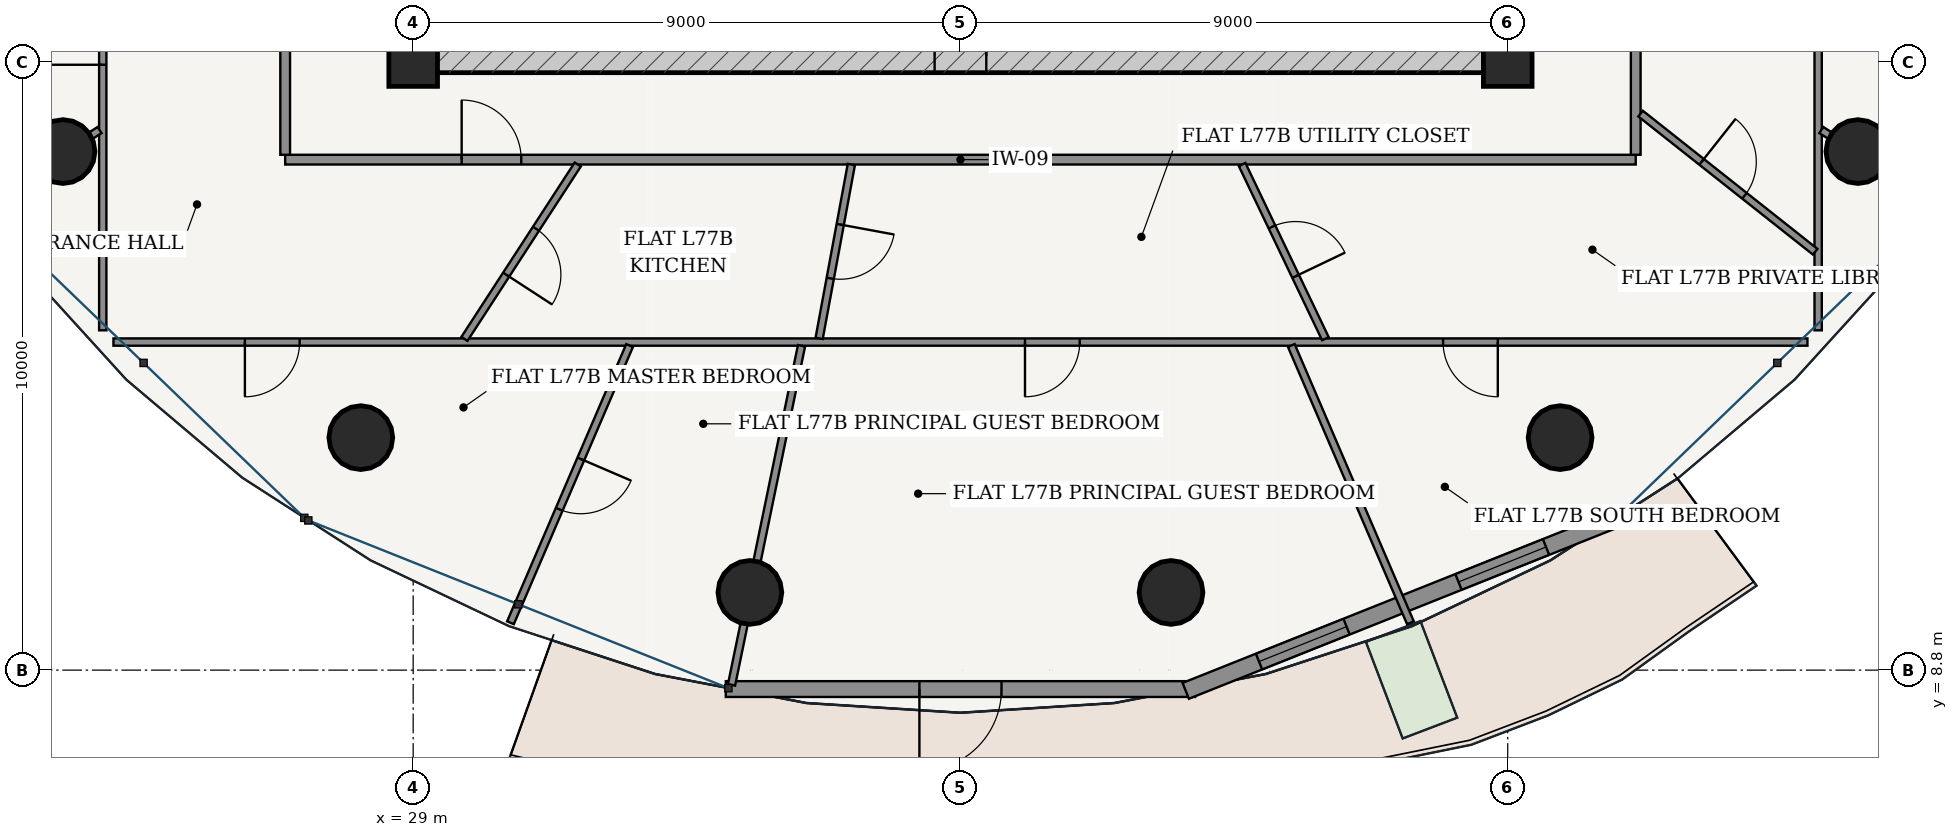
"""IFC4 building model, lengths in metres.
Left out: names, types, materials, properties, quantities, classifications, styles, units other than length and angle.
Written with IfcOpenShell. Run it as: python <this file> out.ifc"""

import sys

from ifc_helpers import new_model, si_unit, direction, frame, frame_2d, origin, origin_2d, place, context, subcontext, project, spatial, rectangle, hollow_circle, extrude, source, transform, mapped, element, fill, save


model = new_model("IFC4")
c1 = context("Model", 3, precision=1e-05, world=origin(), true_north=direction((-0.2419218956, 0.970295726276)))
c2 = subcontext(c1, "Body", "Model", "MODEL_VIEW")
j1 = project(units=[si_unit("LENGTHUNIT", "METRE"), si_unit("PLANEANGLEUNIT", "RADIAN")], contexts=[c1])
p1 = place(None, origin())
s1 = spatial("IfcSite", under=j1, at=p1, CompositionType="ELEMENT")
p2 = place(p1, origin())
s2 = spatial("IfcBuilding", under=s1, at=p2, CompositionType="ELEMENT")
p3 = place(p2, frame((0.0, 0.0, 293.2)))
s3 = spatial("IfcBuildingStorey", under=s2, at=p3, CompositionType="ELEMENT", Elevation=293.2)
for number, where, z_axis, x_axis in (
    (1, (29.0, 18.8, 0.0), (0.0, 0.0, 1.0), (1.0, 0.0, 0.0)),
    (2, (47.0, 18.8, 0.0), (0.0, 0.0, 1.0), (1.0, 0.0, 0.0)),
):
    element("IfcColumn", number, at=place(p3, frame(where, z_axis=z_axis, x_axis=x_axis)), inside=s3, PredefinedType="COLUMN", context=c2, shape_type="SweptSolid", body=[
        extrude(rectangle(XDim=0.8, YDim=0.8, at=origin_2d()), origin(), (0.0, 0.0, 1.0), 3.75),
    ])
p4 = place(p3, frame((28.825, 18.9, 0.0), z_axis=(0.0, 0.0, 1.0), x_axis=(1.0, 0.0, 0.0)))
e3 = element("IfcWall", 3, at=p4, inside=s3, PredefinedType="SHEAR", context=c2, shape_type="SweptSolid", body=[
    extrude(rectangle(XDim=18.35, YDim=0.55, at=frame_2d((9.175, 0.0))), origin(), (0.0, 0.0, 1.0), 3.49),
])
p5 = place(p4, frame((8.75, 0.0, 0.0)))
e4 = element("IfcOpeningElement", 4, at=p5, cuts=e3, PredefinedType="OPENING", context=c2, shape_type="SweptSolid", body=[
    extrude(rectangle(XDim=0.85, YDim=2.1, at=frame_2d((0.425, 1.05))), frame((0.0, 0.285, 0.0), z_axis=(0.0, -1.0, 0.0), x_axis=(1.0, 0.0, 0.0)), (0.0, 0.0, 1.0), 0.57),
])
for number, where, z_axis, x_axis in (
    (5, (23.241, 17.328, 0.0), (0.0, 0.0, 1.0), (1.0, 0.0, 0.0)),
    (6, (28.139, 12.624, 0.0), (0.0, 0.0, 1.0), (1.0, 0.0, 0.0)),
    (7, (34.537, 10.078, 0.0), (0.0, 0.0, 1.0), (1.0, 0.0, 0.0)),
    (8, (41.463, 10.078, 0.0), (0.0, 0.0, 1.0), (1.0, 0.0, 0.0)),
    (9, (47.861, 12.624, 0.0), (0.0, 0.0, 1.0), (1.0, 0.0, 0.0)),
    (10, (52.759, 17.328, 0.0), (0.0, 0.0, 1.0), (1.0, 0.0, 0.0)),
):
    element("IfcColumn", number, at=place(p3, frame(where, z_axis=z_axis, x_axis=x_axis)), inside=s3, PredefinedType="COLUMN", context=c2, shape_type="SweptSolid", body=[
        extrude(hollow_circle(Radius=0.525, WallThickness=0.035, at=origin_2d()), origin(), (0.0, 0.0, 1.0), 3.75),
    ])
p6 = place(p3, frame((34.141, 8.489, 0.0), z_axis=(0.0, 0.0, 1.0), x_axis=(1.0, 0.0, 0.0)))
e11 = element("IfcWall", 11, at=p6, inside=s3, PredefinedType="SOLIDWALL", context=c2, shape_type="SweptSolid", body=[
    extrude(rectangle(XDim=7.718, YDim=0.26, at=frame_2d((3.859, 0.0))), origin(), (0.0, 0.0, 1.0), 3.49),
])
p7 = place(p6, frame((3.184, 0.0, 0.0)))
e12 = element("IfcOpeningElement", 12, at=p7, cuts=e11, PredefinedType="OPENING", context=c2, shape_type="SweptSolid", body=[
    extrude(rectangle(XDim=1.35, YDim=2.2, at=frame_2d((0.675, 1.1))), frame((0.0, 0.14, 0.0), z_axis=(0.0, -1.0, 0.0), x_axis=(1.0, 0.0, 0.0)), (0.0, 0.0, 1.0), 0.28),
])
p8 = place(p3, frame((41.705, 8.459, 0.0), z_axis=(0.0, 0.0, 1.0), x_axis=(0.92871332341, 0.370798547626, 0.0)))
e13 = element("IfcWall", 13, at=p8, inside=s3, PredefinedType="SOLIDWALL", context=c2, shape_type="SweptSolid", body=[
    extrude(rectangle(XDim=7.678, YDim=0.28, at=frame_2d((3.839, 0.0))), origin(), (0.0, 0.0, 1.0), 3.49),
])
p9 = place(p8, frame((1.298, 0.0, 0.85)))
e14 = element("IfcOpeningElement", 14, at=p9, cuts=e13, PredefinedType="OPENING", context=c2, shape_type="SweptSolid", body=[
    extrude(rectangle(XDim=1.55, YDim=1.95, at=frame_2d((0.775, 0.975))), frame((0.0, 0.15, 0.0), z_axis=(0.0, -1.0, 0.0), x_axis=(1.0, 0.0, 0.0)), (0.0, 0.0, 1.0), 0.3),
])
p10 = place(p8, frame((4.83, 0.0, 0.85)))
e15 = element("IfcOpeningElement", 15, at=p10, cuts=e13, PredefinedType="OPENING", context=c2, shape_type="SweptSolid", body=[
    extrude(rectangle(XDim=1.55, YDim=1.95, at=frame_2d((0.775, 0.975))), frame((0.0, 0.15, 0.0), z_axis=(0.0, -1.0, 0.0), x_axis=(1.0, 0.0, 0.0)), (0.0, 0.0, 1.0), 0.3),
])
p11 = place(p3, frame((26.895, 17.195, 0.0), z_axis=(0.0, 0.0, 1.0), x_axis=(1.0, 0.0, 0.0)))
e16 = element("IfcWall", 16, at=p11, inside=s3, PredefinedType="PARTITIONING", context=c2, shape_type="SweptSolid", body=[
    extrude(rectangle(XDim=22.21, YDim=0.16, at=frame_2d((11.105, 0.0))), origin(), (0.0, 0.0, 1.0), 3.015),
])
p12 = place(p11, frame((2.902, 0.0, 0.0)))
e17 = element("IfcOpeningElement", 17, at=p12, cuts=e16, PredefinedType="OPENING", context=c2, shape_type="SweptSolid", body=[
    extrude(rectangle(XDim=0.98, YDim=2.2, at=frame_2d((0.49, 1.1))), frame((0.0, 0.09, 0.0), z_axis=(0.0, -1.0, 0.0), x_axis=(1.0, 0.0, 0.0)), (0.0, 0.0, 1.0), 0.18),
])
for number, where, z_axis, x_axis in (
    (18, (26.895, 17.275, 0.0), (0.0, 0.0, 1.0), (0.0, 1.0, 0.0)),
    (19, (49.105, 17.275, 0.0), (0.0, 0.0, 1.0), (0.0, 1.0, 0.0)),
):
    element("IfcWall", number, at=place(p3, frame(where, z_axis=z_axis, x_axis=x_axis)), inside=s3, PredefinedType="PARTITIONING", context=c2, shape_type="SweptSolid", body=[
        extrude(rectangle(XDim=13.925, YDim=0.16, at=frame_2d((6.962, 0.0))), origin(), (0.0, 0.0, 1.0), 3.015),
    ])
p13 = place(p3, frame((51.929, 14.195, 0.0), z_axis=(0.0, 0.0, 1.0), x_axis=(-1.0, 0.0, 0.0)))
e20 = element("IfcWall", 20, at=p13, inside=s3, PredefinedType="PARTITIONING", context=c2, shape_type="SweptSolid", body=[
    extrude(rectangle(XDim=27.858, YDim=0.12, at=frame_2d((13.929, 0.0))), origin(), (0.0, 0.0, 1.0), 3.015),
])
p14 = place(p13, frame((24.797, 0.0, 0.0)))
e21 = element("IfcOpeningElement", 21, at=p14, cuts=e20, PredefinedType="OPENING", context=c2, shape_type="SweptSolid", body=[
    extrude(rectangle(XDim=0.9, YDim=2.15, at=frame_2d((0.45, 1.075))), frame((0.0, 0.07, 0.0), z_axis=(0.0, -1.0, 0.0), x_axis=(1.0, 0.0, 0.0)), (0.0, 0.0, 1.0), 0.14),
])
p15 = place(p13, frame((11.968, 0.0, 0.0)))
e22 = element("IfcOpeningElement", 22, at=p15, cuts=e20, PredefinedType="OPENING", context=c2, shape_type="SweptSolid", body=[
    extrude(rectangle(XDim=0.9, YDim=2.15, at=frame_2d((0.45, 1.075))), frame((0.0, 0.07, 0.0), z_axis=(0.0, -1.0, 0.0), x_axis=(1.0, 0.0, 0.0)), (0.0, 0.0, 1.0), 0.14),
])
p16 = place(p13, frame((5.092, 0.0, 0.0)))
e23 = element("IfcOpeningElement", 23, at=p16, cuts=e20, PredefinedType="OPENING", context=c2, shape_type="SweptSolid", body=[
    extrude(rectangle(XDim=0.9, YDim=2.15, at=frame_2d((0.45, 1.075))), frame((0.0, 0.07, 0.0), z_axis=(0.0, -1.0, 0.0), x_axis=(1.0, 0.0, 0.0)), (0.0, 0.0, 1.0), 0.14),
])
p17 = place(p3, frame((23.895, 14.388, 0.0), z_axis=(0.0, 0.0, 1.0), x_axis=(0.0, 1.0, 0.0)))
e24 = element("IfcWall", 24, at=p17, inside=s3, PredefinedType="PARTITIONING", context=c2, shape_type="SweptSolid", body=[
    extrude(rectangle(XDim=12.31, YDim=0.12, at=frame_2d((6.155, 0.0))), origin(), (0.0, 0.0, 1.0), 3.015),
])
p18 = place(p17, frame((4.367, 0.0, 0.0)))
e25 = element("IfcOpeningElement", 25, at=p18, cuts=e24, PredefinedType="OPENING", context=c2, shape_type="SweptSolid", body=[
    extrude(rectangle(XDim=0.9, YDim=2.15, at=frame_2d((0.45, 1.075))), frame((0.0, 0.07, 0.0), z_axis=(0.0, -1.0, 0.0), x_axis=(1.0, 0.0, 0.0)), (0.0, 0.0, 1.0), 0.14),
])
p19 = place(p3, frame((52.105, 23.994, 0.0), z_axis=(0.0, 0.0, 1.0), x_axis=(0.0, -1.0, 0.0)))
e26 = element("IfcWall", 26, at=p19, inside=s3, PredefinedType="PARTITIONING", context=c2, shape_type="SweptSolid", body=[
    extrude(rectangle(XDim=9.605, YDim=0.12, at=frame_2d((4.803, 0.0))), origin(), (0.0, 0.0, 1.0), 3.015),
])
p20 = place(p19, frame((2.819, 0.0, 0.0)))
e27 = element("IfcOpeningElement", 27, at=p20, cuts=e26, PredefinedType="OPENING", context=c2, shape_type="SweptSolid", body=[
    extrude(rectangle(XDim=0.9, YDim=2.15, at=frame_2d((0.45, 1.075))), frame((0.0, 0.07, 0.0), z_axis=(0.0, -1.0, 0.0), x_axis=(1.0, 0.0, 0.0)), (0.0, 0.0, 1.0), 0.14),
])
p21 = place(p3, frame((23.843, 17.682, 0.0), z_axis=(0.0, 0.0, 1.0), x_axis=(-0.840690872836, -0.541515333421, 0.0)))
e28 = element("IfcWall", 28, at=p21, inside=s3, PredefinedType="PARTITIONING", context=c2, shape_type="SweptSolid", body=[
    extrude(rectangle(XDim=2.247, YDim=0.12, at=frame_2d((1.123, 0.0))), origin(), (0.0, 0.0, 1.0), 3.015),
])
p22 = place(p3, frame((32.559, 14.138, 0.0), z_axis=(0.0, 0.0, 1.0), x_axis=(-0.394786072864, -0.918773071369, 0.0)))
e29 = element("IfcWall", 29, at=p22, inside=s3, PredefinedType="PARTITIONING", context=c2, shape_type="SweptSolid", body=[
    extrude(rectangle(XDim=4.962, YDim=0.12, at=frame_2d((2.481, 0.0))), origin(), (0.0, 0.0, 1.0), 3.121),
])
p23 = place(p22, frame((2.031, 0.0, 0.0)))
e30 = element("IfcOpeningElement", 30, at=p23, cuts=e29, PredefinedType="OPENING", context=c2, shape_type="SweptSolid", body=[
    extrude(rectangle(XDim=0.9, YDim=2.15, at=frame_2d((0.45, 1.075))), frame((0.0, 0.07, 0.0), z_axis=(0.0, -1.0, 0.0), x_axis=(1.0, 0.0, 0.0)), (0.0, 0.0, 1.0), 0.14),
])
p24 = place(p3, frame((35.386, 14.134, 0.0), z_axis=(0.0, 0.0, 1.0), x_axis=(-0.202089570669, -0.979367043262, 0.0)))
e31 = element("IfcWall", 31, at=p24, inside=s3, PredefinedType="PARTITIONING", context=c2, shape_type="SweptSolid", body=[
    extrude(rectangle(XDim=5.695, YDim=0.12, at=frame_2d((2.847, 0.0))), origin(), (0.0, 0.0, 1.0), 3.015),
])
p25 = place(p3, frame((43.441, 14.138, 0.0), z_axis=(0.0, 0.0, 1.0), x_axis=(0.394786072864, -0.918773071369, 0.0)))
e32 = element("IfcWall", 32, at=p25, inside=s3, PredefinedType="PARTITIONING", context=c2, shape_type="SweptSolid", body=[
    extrude(rectangle(XDim=4.962, YDim=0.12, at=frame_2d((2.481, 0.0))), origin(), (0.0, 0.0, 1.0), 3.121),
])
p26 = place(p3, frame((52.157, 17.682, 0.0), z_axis=(0.0, 0.0, 1.0), x_axis=(0.840690872836, -0.541515333421, 0.0)))
e33 = element("IfcWall", 33, at=p26, inside=s3, PredefinedType="PARTITIONING", context=c2, shape_type="SweptSolid", body=[
    extrude(rectangle(XDim=2.247, YDim=0.12, at=frame_2d((1.123, 0.0))), origin(), (0.0, 0.0, 1.0), 3.015),
])
p27 = place(p3, frame((31.706, 17.115, 0.0), z_axis=(0.0, 0.0, 1.0), x_axis=(-0.544910571015, -0.838494167896, 0.0)))
e34 = element("IfcWall", 34, at=p27, inside=s3, PredefinedType="PARTITIONING", context=c2, shape_type="SweptSolid", body=[
    extrude(rectangle(XDim=3.42, YDim=0.12, at=frame_2d((1.71, 0.0))), origin(), (0.0, 0.0, 1.0), 3.209),
])
p28 = place(p27, frame((1.26, 0.0, 0.0)))
e35 = element("IfcOpeningElement", 35, at=p28, cuts=e34, PredefinedType="OPENING", context=c2, shape_type="SweptSolid", body=[
    extrude(rectangle(XDim=0.9, YDim=2.15, at=frame_2d((0.45, 1.075))), frame((0.0, 0.07, 0.0), z_axis=(0.0, -1.0, 0.0), x_axis=(1.0, 0.0, 0.0)), (0.0, 0.0, 1.0), 0.14),
])
p29 = place(p3, frame((36.206, 17.115, 0.0), z_axis=(0.0, 0.0, 1.0), x_axis=(-0.182194488266, -0.983262512479, 0.0)))
e36 = element("IfcWall", 36, at=p29, inside=s3, PredefinedType="PARTITIONING", context=c2, shape_type="SweptSolid", body=[
    extrude(rectangle(XDim=2.908, YDim=0.12, at=frame_2d((1.454, 0.0))), origin(), (0.0, 0.0, 1.0), 3.209),
])
p30 = place(p29, frame((1.004, 0.0, 0.0)))
e37 = element("IfcOpeningElement", 37, at=p30, cuts=e36, PredefinedType="OPENING", context=c2, shape_type="SweptSolid", body=[
    extrude(rectangle(XDim=0.9, YDim=2.15, at=frame_2d((0.45, 1.075))), frame((0.0, 0.07, 0.0), z_axis=(0.0, -1.0, 0.0), x_axis=(1.0, 0.0, 0.0)), (0.0, 0.0, 1.0), 0.14),
])
p31 = place(p3, frame((42.632, 17.115, 0.0), z_axis=(0.0, 0.0, 1.0), x_axis=(0.431425564071, -0.902148536919, 0.0)))
e38 = element("IfcWall", 38, at=p31, inside=s3, PredefinedType="PARTITIONING", context=c2, shape_type="SweptSolid", body=[
    extrude(rectangle(XDim=3.175, YDim=0.12, at=frame_2d((1.587, 0.0))), origin(), (0.0, 0.0, 1.0), 3.209),
])
p32 = place(p31, frame((1.137, 0.0, 0.0)))
e39 = element("IfcOpeningElement", 39, at=p32, cuts=e38, PredefinedType="OPENING", context=c2, shape_type="SweptSolid", body=[
    extrude(rectangle(XDim=0.9, YDim=2.15, at=frame_2d((0.45, 1.075))), frame((0.0, 0.07, 0.0), z_axis=(0.0, -1.0, 0.0), x_axis=(1.0, 0.0, 0.0)), (0.0, 0.0, 1.0), 0.14),
])
p33 = place(p3, frame((49.185, 17.952, 0.0), z_axis=(0.0, 0.0, 1.0), x_axis=(0.784266179732, -0.620424499297, 0.0)))
e40 = element("IfcWall", 40, at=p33, inside=s3, PredefinedType="PARTITIONING", context=c2, shape_type="SweptSolid", body=[
    extrude(rectangle(XDim=3.661, YDim=0.12, at=frame_2d((1.831, 0.0))), origin(), (0.0, 0.0, 1.0), 3.121),
])
p34 = place(p33, frame((1.279, 0.0, 0.0)))
e41 = element("IfcOpeningElement", 41, at=p34, cuts=e40, PredefinedType="OPENING", context=c2, shape_type="SweptSolid", body=[
    extrude(rectangle(XDim=0.9, YDim=2.15, at=frame_2d((0.45, 1.075))), frame((0.0, 0.07, 0.0), z_axis=(0.0, -1.0, 0.0), x_axis=(1.0, 0.0, 0.0)), (0.0, 0.0, 1.0), 0.14),
])
m1 = source(origin(), c2, "Body", "SweptSolid", [
    extrude(rectangle(XDim=1.35, YDim=2.2, at=frame_2d((0.675, 1.1))), frame((0.0, 0.025, 0.0), z_axis=(0.0, -1.0, 0.0), x_axis=(1.0, 0.0, 0.0)), (0.0, 0.0, 1.0), 0.05),
])
p35 = place(p7, frame((1.35, 0.0, 0.0), z_axis=(0.0, 0.0, 1.0), x_axis=(-1.0, 0.0, 0.0)))
e42 = element("IfcDoor", 42, at=p35, inside=s3, OperationType="SINGLE_SWING_RIGHT", PredefinedType="DOOR", context=c2, shape_type="MappedRepresentation", body=[
    mapped(m1, transform((0.0, 0.0, 0.0), scale=1.0)),
])
fill(e12, e42)
m2 = source(origin(), c2, "Body", "SweptSolid", [
    extrude(rectangle(XDim=1.55, YDim=1.95, at=frame_2d((0.775, 0.975))), frame((0.0, 0.03, 0.0), z_axis=(0.0, -1.0, 0.0), x_axis=(1.0, 0.0, 0.0)), (0.0, 0.0, 1.0), 0.06),
])
p36 = place(p9, origin())
e43 = element("IfcWindow", 43, at=p36, inside=s3, PartitioningType="SINGLE_PANEL", PredefinedType="WINDOW", context=c2, shape_type="MappedRepresentation", body=[
    mapped(m2, transform((0.0, 0.0, 0.0), scale=1.0)),
])
fill(e14, e43)
p37 = place(p10, origin())
e44 = element("IfcWindow", 44, at=p37, inside=s3, PartitioningType="SINGLE_PANEL", PredefinedType="WINDOW", context=c2, shape_type="MappedRepresentation", body=[
    mapped(m2, transform((0.0, 0.0, 0.0), scale=1.0)),
])
fill(e15, e44)
m3 = source(origin(), c2, "Body", "SweptSolid", [
    extrude(rectangle(XDim=0.85, YDim=2.1, at=frame_2d((0.425, 1.05))), frame((0.0, 0.025, 0.0), z_axis=(0.0, -1.0, 0.0), x_axis=(1.0, 0.0, 0.0)), (0.0, 0.0, 1.0), 0.05),
])
p38 = place(p5, origin())
e45 = element("IfcDoor", 45, at=p38, inside=s3, OperationType="SINGLE_SWING_RIGHT", PredefinedType="DOOR", context=c2, shape_type="MappedRepresentation", body=[
    mapped(m3, transform((0.0, 0.0, 0.0), scale=1.0)),
])
fill(e4, e45)
m4 = source(origin(), c2, "Body", "SweptSolid", [
    extrude(rectangle(XDim=0.98, YDim=2.2, at=frame_2d((0.49, 1.1))), frame((0.0, 0.025, 0.0), z_axis=(0.0, -1.0, 0.0), x_axis=(1.0, 0.0, 0.0)), (0.0, 0.0, 1.0), 0.05),
])
p39 = place(p12, origin())
e46 = element("IfcDoor", 46, at=p39, inside=s3, OperationType="SINGLE_SWING_LEFT", PredefinedType="DOOR", context=c2, shape_type="MappedRepresentation", body=[
    mapped(m4, transform((0.0, 0.0, 0.0), scale=1.0)),
])
fill(e17, e46)
m5 = source(origin(), c2, "Body", "SweptSolid", [
    extrude(rectangle(XDim=0.9, YDim=2.15, at=frame_2d((0.45, 1.075))), frame((0.0, 0.025, 0.0), z_axis=(0.0, -1.0, 0.0), x_axis=(1.0, 0.0, 0.0)), (0.0, 0.0, 1.0), 0.05),
])
p40 = place(p18, origin())
e47 = element("IfcDoor", 47, at=p40, inside=s3, OperationType="SINGLE_SWING_LEFT", PredefinedType="DOOR", context=c2, shape_type="MappedRepresentation", body=[
    mapped(m5, transform((0.0, 0.0, 0.0), scale=1.0)),
])
fill(e25, e47)
p41 = place(p28, origin())
e48 = element("IfcDoor", 48, at=p41, inside=s3, OperationType="SINGLE_SWING_RIGHT", PredefinedType="DOOR", context=c2, shape_type="MappedRepresentation", body=[
    mapped(m5, transform((0.0, 0.0, 0.0), scale=1.0)),
])
fill(e35, e48)
p42 = place(p30, origin())
e49 = element("IfcDoor", 49, at=p42, inside=s3, OperationType="SINGLE_SWING_LEFT", PredefinedType="DOOR", context=c2, shape_type="MappedRepresentation", body=[
    mapped(m5, transform((0.0, 0.0, 0.0), scale=1.0)),
])
fill(e37, e49)
p43 = place(p32, origin())
e50 = element("IfcDoor", 50, at=p43, inside=s3, OperationType="SINGLE_SWING_RIGHT", PredefinedType="DOOR", context=c2, shape_type="MappedRepresentation", body=[
    mapped(m5, transform((0.0, 0.0, 0.0), scale=1.0)),
])
fill(e39, e50)
p44 = place(p34, origin())
e51 = element("IfcDoor", 51, at=p44, inside=s3, OperationType="SINGLE_SWING_LEFT", PredefinedType="DOOR", context=c2, shape_type="MappedRepresentation", body=[
    mapped(m5, transform((0.0, 0.0, 0.0), scale=1.0)),
])
fill(e41, e51)
p45 = place(p14, origin())
e52 = element("IfcDoor", 52, at=p45, inside=s3, OperationType="SINGLE_SWING_RIGHT", PredefinedType="DOOR", context=c2, shape_type="MappedRepresentation", body=[
    mapped(m5, transform((0.0, 0.0, 0.0), scale=1.0)),
])
fill(e21, e52)
p46 = place(p23, origin())
e53 = element("IfcDoor", 53, at=p46, inside=s3, OperationType="SINGLE_SWING_LEFT", PredefinedType="DOOR", context=c2, shape_type="MappedRepresentation", body=[
    mapped(m5, transform((0.0, 0.0, 0.0), scale=1.0)),
])
fill(e30, e53)
p47 = place(p15, origin())
e54 = element("IfcDoor", 54, at=p47, inside=s3, OperationType="SINGLE_SWING_RIGHT", PredefinedType="DOOR", context=c2, shape_type="MappedRepresentation", body=[
    mapped(m5, transform((0.0, 0.0, 0.0), scale=1.0)),
])
fill(e22, e54)
p48 = place(p16, origin())
e55 = element("IfcDoor", 55, at=p48, inside=s3, OperationType="SINGLE_SWING_LEFT", PredefinedType="DOOR", context=c2, shape_type="MappedRepresentation", body=[
    mapped(m5, transform((0.0, 0.0, 0.0), scale=1.0)),
])
fill(e23, e55)
save(model, sys.argv[1])
